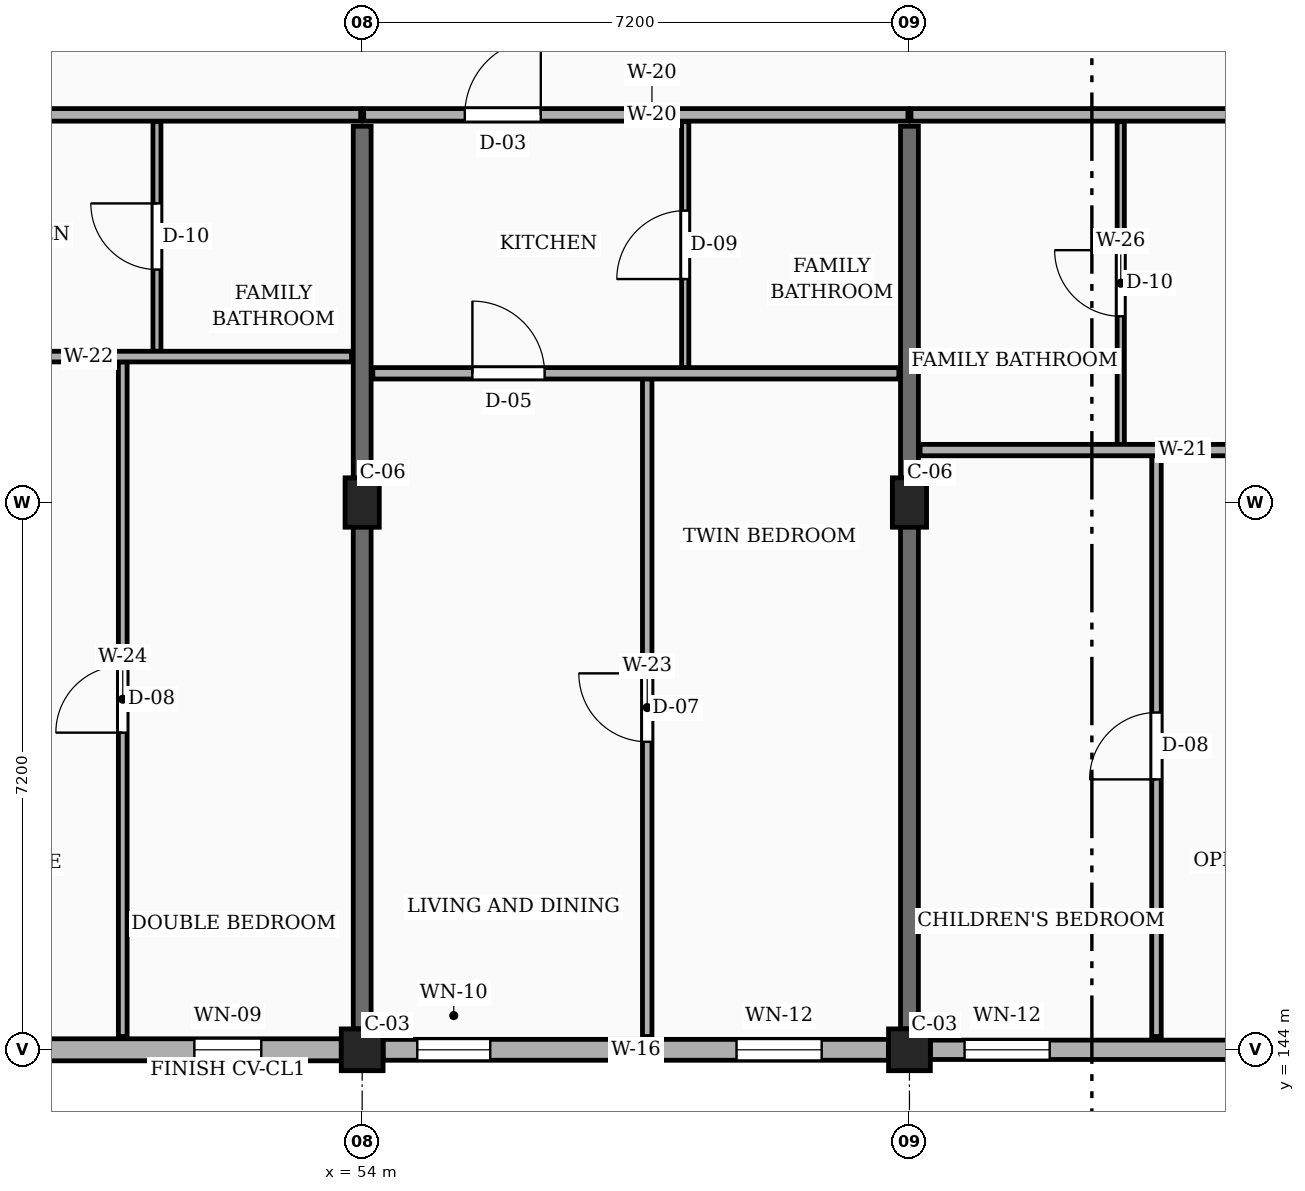
"""IFC4 building model, lengths in metres.
Left out: names, types, materials, properties, quantities, classifications, styles, units other than length and angle.
Written with IfcOpenShell. Run it as: python <this file> out.ifc"""

import sys

from ifc_helpers import new_model, si_unit, direction, frame, frame_2d, origin, origin_2d, place, context, subcontext, project, spatial, rectangle, extrude, element, fill, save


model = new_model("IFC4")
c1 = context("Model", 3, precision=1e-05, world=origin(), true_north=direction((0.0, 1.0)))
c2 = subcontext(c1, "Body", "Model", "MODEL_VIEW")
j1 = project(units=[si_unit("LENGTHUNIT", "METRE"), si_unit("PLANEANGLEUNIT", "RADIAN")], contexts=[c1])
p1 = place(None, origin())
s1 = spatial("IfcSite", under=j1, at=p1, CompositionType="ELEMENT")
p2 = place(p1, origin())
s2 = spatial("IfcBuilding", under=s1, at=p2, CompositionType="ELEMENT")
p3 = place(p2, frame((0.0, 0.0, 17.1)))
s3 = spatial("IfcBuildingStorey", under=s2, at=p3, CompositionType="ELEMENT", Elevation=17.1)
p4 = place(p3, frame((54.0, 144.0, 0.0), z_axis=(0.0, 0.0, 1.0), x_axis=(1.0, 0.0, 0.0)))
e1 = element("IfcColumn", 1, at=p4, inside=s3, PredefinedType="COLUMN", context=c2, shape_type="SweptSolid", body=[
    extrude(rectangle(XDim=0.55, YDim=0.55, at=origin_2d()), origin(), (0.0, 0.0, 1.0), 3.15),
])
p5 = place(p3, frame((54.0, 151.2, 0.0), z_axis=(0.0, 0.0, 1.0), x_axis=(1.0, 0.0, 0.0)))
e2 = element("IfcColumn", 2, at=p5, inside=s3, PredefinedType="COLUMN", context=c2, shape_type="SweptSolid", body=[
    extrude(rectangle(XDim=0.45, YDim=0.65, at=origin_2d()), origin(), (0.0, 0.0, 1.0), 3.15),
])
p6 = place(p3, frame((61.2, 144.0, 0.0), z_axis=(0.0, 0.0, 1.0), x_axis=(1.0, 0.0, 0.0)))
e3 = element("IfcColumn", 3, at=p6, inside=s3, PredefinedType="COLUMN", context=c2, shape_type="SweptSolid", body=[
    extrude(rectangle(XDim=0.55, YDim=0.55, at=origin_2d()), origin(), (0.0, 0.0, 1.0), 3.15),
])
p7 = place(p3, frame((61.2, 151.2, 0.0), z_axis=(0.0, 0.0, 1.0), x_axis=(1.0, 0.0, 0.0)))
e4 = element("IfcColumn", 4, at=p7, inside=s3, PredefinedType="COLUMN", context=c2, shape_type="SweptSolid", body=[
    extrude(rectangle(XDim=0.45, YDim=0.65, at=origin_2d()), origin(), (0.0, 0.0, 1.0), 3.15),
])
for number, where, z_axis, x_axis in (
    (5, (54.0, 144.275, 0.0), (0.0, 0.0, 1.0), (0.0, 1.0, 0.0)),
    (6, (61.2, 144.275, 0.0), (0.0, 0.0, 1.0), (0.0, 1.0, 0.0)),
):
    element("IfcWall", number, at=place(p3, frame(where, z_axis=z_axis, x_axis=x_axis)), inside=s3, PredefinedType="SOLIDWALL", context=c2, shape_type="SweptSolid", body=[
        extrude(rectangle(XDim=11.875, YDim=0.235, at=frame_2d((5.938, 0.0))), origin(), (0.0, 0.0, 1.0), 2.185),
    ])
p8 = place(p3, frame((49.82, 144.0, 0.0), z_axis=(0.0, 0.0, 1.0), x_axis=(1.0, 0.0, 0.0)))
e7 = element("IfcWall", 7, at=p8, inside=s3, PredefinedType="SOLIDWALL", context=c2, shape_type="SweptSolid", body=[
    extrude(rectangle(XDim=3.905, YDim=0.29, at=frame_2d((1.953, 0.0))), origin(), (0.0, 0.0, 1.0), 2.455),
])
p9 = place(p8, frame((1.972, 0.0, 0.78)))
e8 = element("IfcOpeningElement", 8, at=p9, cuts=e7, PredefinedType="OPENING", context=c2, shape_type="SweptSolid", body=[
    extrude(rectangle(XDim=0.88, YDim=1.26, at=frame_2d((0.44, 0.63))), frame((0.0, 0.155, 0.0), z_axis=(0.0, -1.0, 0.0), x_axis=(1.0, 0.0, 0.0)), (0.0, 0.0, 1.0), 0.31),
])
p10 = place(p3, frame((54.275, 144.0, 0.0), z_axis=(0.0, 0.0, 1.0), x_axis=(1.0, 0.0, 0.0)))
e9 = element("IfcWall", 9, at=p10, inside=s3, PredefinedType="SOLIDWALL", context=c2, shape_type="SweptSolid", body=[
    extrude(rectangle(XDim=6.65, YDim=0.275, at=frame_2d((3.325, 0.0))), origin(), (0.0, 0.0, 1.0), 2.455),
])
p11 = place(p10, frame((0.45, 0.0, 0.78)))
e10 = element("IfcOpeningElement", 10, at=p11, cuts=e9, PredefinedType="OPENING", context=c2, shape_type="SweptSolid", body=[
    extrude(rectangle(XDim=0.96, YDim=1.26, at=frame_2d((0.48, 0.63))), frame((0.0, 0.147, 0.0), z_axis=(0.0, -1.0, 0.0), x_axis=(1.0, 0.0, 0.0)), (0.0, 0.0, 1.0), 0.295),
])
p12 = place(p10, frame((4.65, 0.0, 0.78)))
e11 = element("IfcOpeningElement", 11, at=p12, cuts=e9, PredefinedType="OPENING", context=c2, shape_type="SweptSolid", body=[
    extrude(rectangle(XDim=1.12, YDim=1.26, at=frame_2d((0.56, 0.63))), frame((0.0, 0.147, 0.0), z_axis=(0.0, -1.0, 0.0), x_axis=(1.0, 0.0, 0.0)), (0.0, 0.0, 1.0), 0.295),
])
p13 = place(p3, frame((61.475, 144.0, 0.0), z_axis=(0.0, 0.0, 1.0), x_axis=(1.0, 0.0, 0.0)))
e12 = element("IfcWall", 12, at=p13, inside=s3, PredefinedType="SOLIDWALL", context=c2, shape_type="SweptSolid", body=[
    extrude(rectangle(XDim=6.65, YDim=0.255, at=frame_2d((3.325, 0.0))), origin(), (0.0, 0.0, 1.0), 2.455),
])
p14 = place(p13, frame((0.45, 0.0, 0.78)))
e13 = element("IfcOpeningElement", 13, at=p14, cuts=e12, PredefinedType="OPENING", context=c2, shape_type="SweptSolid", body=[
    extrude(rectangle(XDim=1.12, YDim=1.26, at=frame_2d((0.56, 0.63))), frame((0.0, 0.137, 0.0), z_axis=(0.0, -1.0, 0.0), x_axis=(1.0, 0.0, 0.0)), (0.0, 0.0, 1.0), 0.275),
])
p15 = place(p13, frame((4.65, 0.0, 0.78)))
e14 = element("IfcOpeningElement", 14, at=p15, cuts=e12, PredefinedType="OPENING", context=c2, shape_type="SweptSolid", body=[
    extrude(rectangle(XDim=1.28, YDim=1.26, at=frame_2d((0.64, 0.63))), frame((0.0, 0.137, 0.0), z_axis=(0.0, -1.0, 0.0), x_axis=(1.0, 0.0, 0.0)), (0.0, 0.0, 1.0), 0.275),
])
p16 = place(p3, frame((46.82, 156.3, 0.0), z_axis=(0.0, 0.0, 1.0), x_axis=(1.0, 0.0, 0.0)))
e15 = element("IfcWall", 15, at=p16, inside=s3, PredefinedType="PARTITIONING", context=c2, shape_type="SweptSolid", body=[
    extrude(rectangle(XDim=7.16, YDim=0.165, at=frame_2d((3.58, 0.0))), origin(), (0.0, 0.0, 1.0), 2.32),
])
p17 = place(p16, frame((1.33, 0.0, 0.0)))
e16 = element("IfcOpeningElement", 16, at=p17, cuts=e15, PredefinedType="OPENING", context=c2, shape_type="SweptSolid", body=[
    extrude(rectangle(XDim=1.14, YDim=2.18, at=frame_2d((0.57, 1.09))), frame((0.0, 0.093, 0.0), z_axis=(0.0, -1.0, 0.0), x_axis=(1.0, 0.0, 0.0)), (0.0, 0.0, 1.0), 0.185),
])
p18 = place(p3, frame((54.02, 156.3, 0.0), z_axis=(0.0, 0.0, 1.0), x_axis=(1.0, 0.0, 0.0)))
e17 = element("IfcWall", 17, at=p18, inside=s3, PredefinedType="PARTITIONING", context=c2, shape_type="SweptSolid", body=[
    extrude(rectangle(XDim=7.16, YDim=0.165, at=frame_2d((3.58, 0.0))), origin(), (0.0, 0.0, 1.0), 2.32),
])
p19 = place(p18, frame((1.33, 0.0, 0.0)))
e18 = element("IfcOpeningElement", 18, at=p19, cuts=e17, PredefinedType="OPENING", context=c2, shape_type="SweptSolid", body=[
    extrude(rectangle(XDim=1.0, YDim=2.15, at=frame_2d((0.5, 1.075))), frame((0.0, 0.093, 0.0), z_axis=(0.0, -1.0, 0.0), x_axis=(1.0, 0.0, 0.0)), (0.0, 0.0, 1.0), 0.185),
])
p20 = place(p3, frame((61.22, 156.3, 0.0), z_axis=(0.0, 0.0, 1.0), x_axis=(1.0, 0.0, 0.0)))
e19 = element("IfcWall", 19, at=p20, inside=s3, PredefinedType="PARTITIONING", context=c2, shape_type="SweptSolid", body=[
    extrude(rectangle(XDim=7.16, YDim=0.165, at=frame_2d((3.58, 0.0))), origin(), (0.0, 0.0, 1.0), 2.32),
])
p21 = place(p20, frame((4.78, 0.0, 0.0)))
e20 = element("IfcOpeningElement", 20, at=p21, cuts=e19, PredefinedType="OPENING", context=c2, shape_type="SweptSolid", body=[
    extrude(rectangle(XDim=0.94, YDim=2.12, at=frame_2d((0.47, 1.06))), frame((0.0, 0.093, 0.0), z_axis=(0.0, -1.0, 0.0), x_axis=(1.0, 0.0, 0.0)), (0.0, 0.0, 1.0), 0.185),
])
p22 = place(p3, frame((50.85, 144.175, 0.0), z_axis=(0.0, 0.0, 1.0), x_axis=(0.0, 1.0, 0.0)))
e21 = element("IfcWall", 21, at=p22, inside=s3, PredefinedType="PARTITIONING", context=c2, shape_type="SweptSolid", body=[
    extrude(rectangle(XDim=8.875, YDim=0.115, at=frame_2d((4.438, 0.0))), origin(), (0.0, 0.0, 1.0), 2.32),
])
p23 = place(p22, frame((3.998, 0.0, 0.0)))
e22 = element("IfcOpeningElement", 22, at=p23, cuts=e21, PredefinedType="OPENING", context=c2, shape_type="SweptSolid", body=[
    extrude(rectangle(XDim=0.88, YDim=2.08, at=frame_2d((0.44, 1.04))), frame((0.0, 0.067, 0.0), z_axis=(0.0, -1.0, 0.0), x_axis=(1.0, 0.0, 0.0)), (0.0, 0.0, 1.0), 0.135),
])
p24 = place(p3, frame((51.3, 153.19, 0.0), z_axis=(0.0, 0.0, 1.0), x_axis=(0.0, 1.0, 0.0)))
e23 = element("IfcWall", 23, at=p24, inside=s3, PredefinedType="PARTITIONING", context=c2, shape_type="SweptSolid", body=[
    extrude(rectangle(XDim=3.02, YDim=0.105, at=frame_2d((1.51, 0.0))), origin(), (0.0, 0.0, 1.0), 2.32),
])
p25 = place(p24, frame((1.075, 0.0, 0.0)))
e24 = element("IfcOpeningElement", 24, at=p25, cuts=e23, PredefinedType="OPENING", context=c2, shape_type="SweptSolid", body=[
    extrude(rectangle(XDim=0.87, YDim=2.05, at=frame_2d((0.435, 1.025))), frame((0.0, 0.062, 0.0), z_axis=(0.0, -1.0, 0.0), x_axis=(1.0, 0.0, 0.0)), (0.0, 0.0, 1.0), 0.125),
])
p26 = place(p3, frame((46.94, 153.12, 0.0), z_axis=(0.0, 0.0, 1.0), x_axis=(1.0, 0.0, 0.0)))
e25 = element("IfcWall", 25, at=p26, inside=s3, PredefinedType="PARTITIONING", context=c2, shape_type="SweptSolid", body=[
    extrude(rectangle(XDim=6.92, YDim=0.14, at=frame_2d((3.46, 0.0))), origin(), (0.0, 0.0, 1.0), 2.32),
])
p27 = place(p26, frame((1.31, 0.0, 0.0)))
e26 = element("IfcOpeningElement", 26, at=p27, cuts=e25, PredefinedType="OPENING", context=c2, shape_type="SweptSolid", body=[
    extrude(rectangle(XDim=0.92, YDim=2.1, at=frame_2d((0.46, 1.05))), frame((0.0, 0.08, 0.0), z_axis=(0.0, -1.0, 0.0), x_axis=(1.0, 0.0, 0.0)), (0.0, 0.0, 1.0), 0.16),
])
p28 = place(p3, frame((57.75, 144.175, 0.0), z_axis=(0.0, 0.0, 1.0), x_axis=(0.0, 1.0, 0.0)))
e27 = element("IfcWall", 27, at=p28, inside=s3, PredefinedType="PARTITIONING", context=c2, shape_type="SweptSolid", body=[
    extrude(rectangle(XDim=8.655, YDim=0.125, at=frame_2d((4.328, 0.0))), origin(), (0.0, 0.0, 1.0), 2.32),
])
p29 = place(p28, frame((3.877, 0.0, 0.0)))
e28 = element("IfcOpeningElement", 28, at=p29, cuts=e27, PredefinedType="OPENING", context=c2, shape_type="SweptSolid", body=[
    extrude(rectangle(XDim=0.9, YDim=2.1, at=frame_2d((0.45, 1.05))), frame((0.0, 0.073, 0.0), z_axis=(0.0, -1.0, 0.0), x_axis=(1.0, 0.0, 0.0)), (0.0, 0.0, 1.0), 0.145),
])
p30 = place(p3, frame((58.25, 152.97, 0.0), z_axis=(0.0, 0.0, 1.0), x_axis=(0.0, 1.0, 0.0)))
e29 = element("IfcWall", 29, at=p30, inside=s3, PredefinedType="PARTITIONING", context=c2, shape_type="SweptSolid", body=[
    extrude(rectangle(XDim=3.24, YDim=0.095, at=frame_2d((1.62, 0.0))), origin(), (0.0, 0.0, 1.0), 2.32),
])
p31 = place(p30, frame((1.17, 0.0, 0.0)))
e30 = element("IfcOpeningElement", 30, at=p31, cuts=e29, PredefinedType="OPENING", context=c2, shape_type="SweptSolid", body=[
    extrude(rectangle(XDim=0.9, YDim=2.05, at=frame_2d((0.45, 1.025))), frame((0.0, 0.058, 0.0), z_axis=(0.0, -1.0, 0.0), x_axis=(1.0, 0.0, 0.0)), (0.0, 0.0, 1.0), 0.115),
])
p32 = place(p3, frame((54.14, 152.9, 0.0), z_axis=(0.0, 0.0, 1.0), x_axis=(1.0, 0.0, 0.0)))
e31 = element("IfcWall", 31, at=p32, inside=s3, PredefinedType="PARTITIONING", context=c2, shape_type="SweptSolid", body=[
    extrude(rectangle(XDim=6.92, YDim=0.15, at=frame_2d((3.46, 0.0))), origin(), (0.0, 0.0, 1.0), 2.32),
])
p33 = place(p32, frame((1.31, 0.0, 0.0)))
e32 = element("IfcOpeningElement", 32, at=p33, cuts=e31, PredefinedType="OPENING", context=c2, shape_type="SweptSolid", body=[
    extrude(rectangle(XDim=0.95, YDim=2.1, at=frame_2d((0.475, 1.05))), frame((0.0, 0.085, 0.0), z_axis=(0.0, -1.0, 0.0), x_axis=(1.0, 0.0, 0.0)), (0.0, 0.0, 1.0), 0.17),
])
p34 = place(p3, frame((64.45, 144.175, 0.0), z_axis=(0.0, 0.0, 1.0), x_axis=(0.0, 1.0, 0.0)))
e33 = element("IfcWall", 33, at=p34, inside=s3, PredefinedType="PARTITIONING", context=c2, shape_type="SweptSolid", body=[
    extrude(rectangle(XDim=7.645, YDim=0.125, at=frame_2d((3.823, 0.0))), origin(), (0.0, 0.0, 1.0), 2.32),
])
p35 = place(p34, frame((3.383, 0.0, 0.0)))
e34 = element("IfcOpeningElement", 34, at=p35, cuts=e33, PredefinedType="OPENING", context=c2, shape_type="SweptSolid", body=[
    extrude(rectangle(XDim=0.88, YDim=2.08, at=frame_2d((0.44, 1.04))), frame((0.0, 0.073, 0.0), z_axis=(0.0, -1.0, 0.0), x_axis=(1.0, 0.0, 0.0)), (0.0, 0.0, 1.0), 0.145),
])
p36 = place(p3, frame((63.98, 151.96, 0.0), z_axis=(0.0, 0.0, 1.0), x_axis=(0.0, 1.0, 0.0)))
e35 = element("IfcWall", 35, at=p36, inside=s3, PredefinedType="PARTITIONING", context=c2, shape_type="SweptSolid", body=[
    extrude(rectangle(XDim=4.25, YDim=0.095, at=frame_2d((2.125, 0.0))), origin(), (0.0, 0.0, 1.0), 2.32),
])
p37 = place(p36, frame((1.69, 0.0, 0.0)))
e36 = element("IfcOpeningElement", 36, at=p37, cuts=e35, PredefinedType="OPENING", context=c2, shape_type="SweptSolid", body=[
    extrude(rectangle(XDim=0.87, YDim=2.05, at=frame_2d((0.435, 1.025))), frame((0.0, 0.058, 0.0), z_axis=(0.0, -1.0, 0.0), x_axis=(1.0, 0.0, 0.0)), (0.0, 0.0, 1.0), 0.115),
])
p38 = place(p3, frame((61.34, 151.89, 0.0), z_axis=(0.0, 0.0, 1.0), x_axis=(1.0, 0.0, 0.0)))
e37 = element("IfcWall", 37, at=p38, inside=s3, PredefinedType="PARTITIONING", context=c2, shape_type="SweptSolid", body=[
    extrude(rectangle(XDim=6.92, YDim=0.15, at=frame_2d((3.46, 0.0))), origin(), (0.0, 0.0, 1.0), 2.32),
])
p39 = place(p38, frame((4.66, 0.0, 0.0)))
e38 = element("IfcOpeningElement", 38, at=p39, cuts=e37, PredefinedType="OPENING", context=c2, shape_type="SweptSolid", body=[
    extrude(rectangle(XDim=0.92, YDim=2.1, at=frame_2d((0.46, 1.05))), frame((0.0, 0.085, 0.0), z_axis=(0.0, -1.0, 0.0), x_axis=(1.0, 0.0, 0.0)), (0.0, 0.0, 1.0), 0.17),
])
p40 = place(p9, origin())
e39 = element("IfcWindow", 39, at=p40, inside=s3, PartitioningType="SINGLE_PANEL", PredefinedType="WINDOW", context=c2, shape_type="SweptSolid", body=[
    extrude(rectangle(XDim=0.88, YDim=1.26, at=frame_2d((0.44, 0.63))), frame((0.0, 0.03, 0.0), z_axis=(0.0, -1.0, 0.0), x_axis=(1.0, 0.0, 0.0)), (0.0, 0.0, 1.0), 0.06),
])
fill(e8, e39)
p41 = place(p11, origin())
e40 = element("IfcWindow", 40, at=p41, inside=s3, PartitioningType="SINGLE_PANEL", PredefinedType="WINDOW", context=c2, shape_type="SweptSolid", body=[
    extrude(rectangle(XDim=0.96, YDim=1.26, at=frame_2d((0.48, 0.63))), frame((0.0, 0.03, 0.0), z_axis=(0.0, -1.0, 0.0), x_axis=(1.0, 0.0, 0.0)), (0.0, 0.0, 1.0), 0.06),
])
fill(e10, e40)
p42 = place(p12, origin())
e41 = element("IfcWindow", 41, at=p42, inside=s3, PartitioningType="SINGLE_PANEL", PredefinedType="WINDOW", context=c2, shape_type="SweptSolid", body=[
    extrude(rectangle(XDim=1.12, YDim=1.26, at=frame_2d((0.56, 0.63))), frame((0.0, 0.03, 0.0), z_axis=(0.0, -1.0, 0.0), x_axis=(1.0, 0.0, 0.0)), (0.0, 0.0, 1.0), 0.06),
])
fill(e11, e41)
p43 = place(p14, origin())
e42 = element("IfcWindow", 42, at=p43, inside=s3, PartitioningType="SINGLE_PANEL", PredefinedType="WINDOW", context=c2, shape_type="SweptSolid", body=[
    extrude(rectangle(XDim=1.12, YDim=1.26, at=frame_2d((0.56, 0.63))), frame((0.0, 0.03, 0.0), z_axis=(0.0, -1.0, 0.0), x_axis=(1.0, 0.0, 0.0)), (0.0, 0.0, 1.0), 0.06),
])
fill(e13, e42)
p44 = place(p19, origin())
e43 = element("IfcDoor", 43, at=p44, inside=s3, OperationType="SINGLE_SWING_RIGHT", PredefinedType="DOOR", context=c2, shape_type="SweptSolid", body=[
    extrude(rectangle(XDim=1.0, YDim=2.15, at=frame_2d((0.5, 1.075))), frame((0.0, 0.025, 0.0), z_axis=(0.0, -1.0, 0.0), x_axis=(1.0, 0.0, 0.0)), (0.0, 0.0, 1.0), 0.05),
])
fill(e18, e43)
p45 = place(p23, origin())
e44 = element("IfcDoor", 44, at=p45, inside=s3, OperationType="SINGLE_SWING_LEFT", PredefinedType="DOOR", context=c2, shape_type="SweptSolid", body=[
    extrude(rectangle(XDim=0.88, YDim=2.08, at=frame_2d((0.44, 1.04))), frame((0.0, 0.025, 0.0), z_axis=(0.0, -1.0, 0.0), x_axis=(1.0, 0.0, 0.0)), (0.0, 0.0, 1.0), 0.05),
])
fill(e22, e44)
p46 = place(p25, origin())
e45 = element("IfcDoor", 45, at=p46, inside=s3, OperationType="SINGLE_SWING_RIGHT", PredefinedType="DOOR", context=c2, shape_type="SweptSolid", body=[
    extrude(rectangle(XDim=0.87, YDim=2.05, at=frame_2d((0.435, 1.025))), frame((0.0, 0.025, 0.0), z_axis=(0.0, -1.0, 0.0), x_axis=(1.0, 0.0, 0.0)), (0.0, 0.0, 1.0), 0.05),
])
fill(e24, e45)
p47 = place(p29, origin())
e46 = element("IfcDoor", 46, at=p47, inside=s3, OperationType="SINGLE_SWING_RIGHT", PredefinedType="DOOR", context=c2, shape_type="SweptSolid", body=[
    extrude(rectangle(XDim=0.9, YDim=2.1, at=frame_2d((0.45, 1.05))), frame((0.0, 0.025, 0.0), z_axis=(0.0, -1.0, 0.0), x_axis=(1.0, 0.0, 0.0)), (0.0, 0.0, 1.0), 0.05),
])
fill(e28, e46)
p48 = place(p31, origin())
e47 = element("IfcDoor", 47, at=p48, inside=s3, OperationType="SINGLE_SWING_LEFT", PredefinedType="DOOR", context=c2, shape_type="SweptSolid", body=[
    extrude(rectangle(XDim=0.9, YDim=2.05, at=frame_2d((0.45, 1.025))), frame((0.0, 0.025, 0.0), z_axis=(0.0, -1.0, 0.0), x_axis=(1.0, 0.0, 0.0)), (0.0, 0.0, 1.0), 0.05),
])
fill(e30, e47)
p49 = place(p33, origin())
e48 = element("IfcDoor", 48, at=p49, inside=s3, OperationType="SINGLE_SWING_LEFT", PredefinedType="DOOR", context=c2, shape_type="SweptSolid", body=[
    extrude(rectangle(XDim=0.95, YDim=2.1, at=frame_2d((0.475, 1.05))), frame((0.0, 0.025, 0.0), z_axis=(0.0, -1.0, 0.0), x_axis=(1.0, 0.0, 0.0)), (0.0, 0.0, 1.0), 0.05),
])
fill(e32, e48)
p50 = place(p35, origin())
e49 = element("IfcDoor", 49, at=p50, inside=s3, OperationType="SINGLE_SWING_LEFT", PredefinedType="DOOR", context=c2, shape_type="SweptSolid", body=[
    extrude(rectangle(XDim=0.88, YDim=2.08, at=frame_2d((0.44, 1.04))), frame((0.0, 0.025, 0.0), z_axis=(0.0, -1.0, 0.0), x_axis=(1.0, 0.0, 0.0)), (0.0, 0.0, 1.0), 0.05),
])
fill(e34, e49)
p51 = place(p37, origin())
e50 = element("IfcDoor", 50, at=p51, inside=s3, OperationType="SINGLE_SWING_RIGHT", PredefinedType="DOOR", context=c2, shape_type="SweptSolid", body=[
    extrude(rectangle(XDim=0.87, YDim=2.05, at=frame_2d((0.435, 1.025))), frame((0.0, 0.025, 0.0), z_axis=(0.0, -1.0, 0.0), x_axis=(1.0, 0.0, 0.0)), (0.0, 0.0, 1.0), 0.05),
])
fill(e36, e50)
save(model, sys.argv[1])
